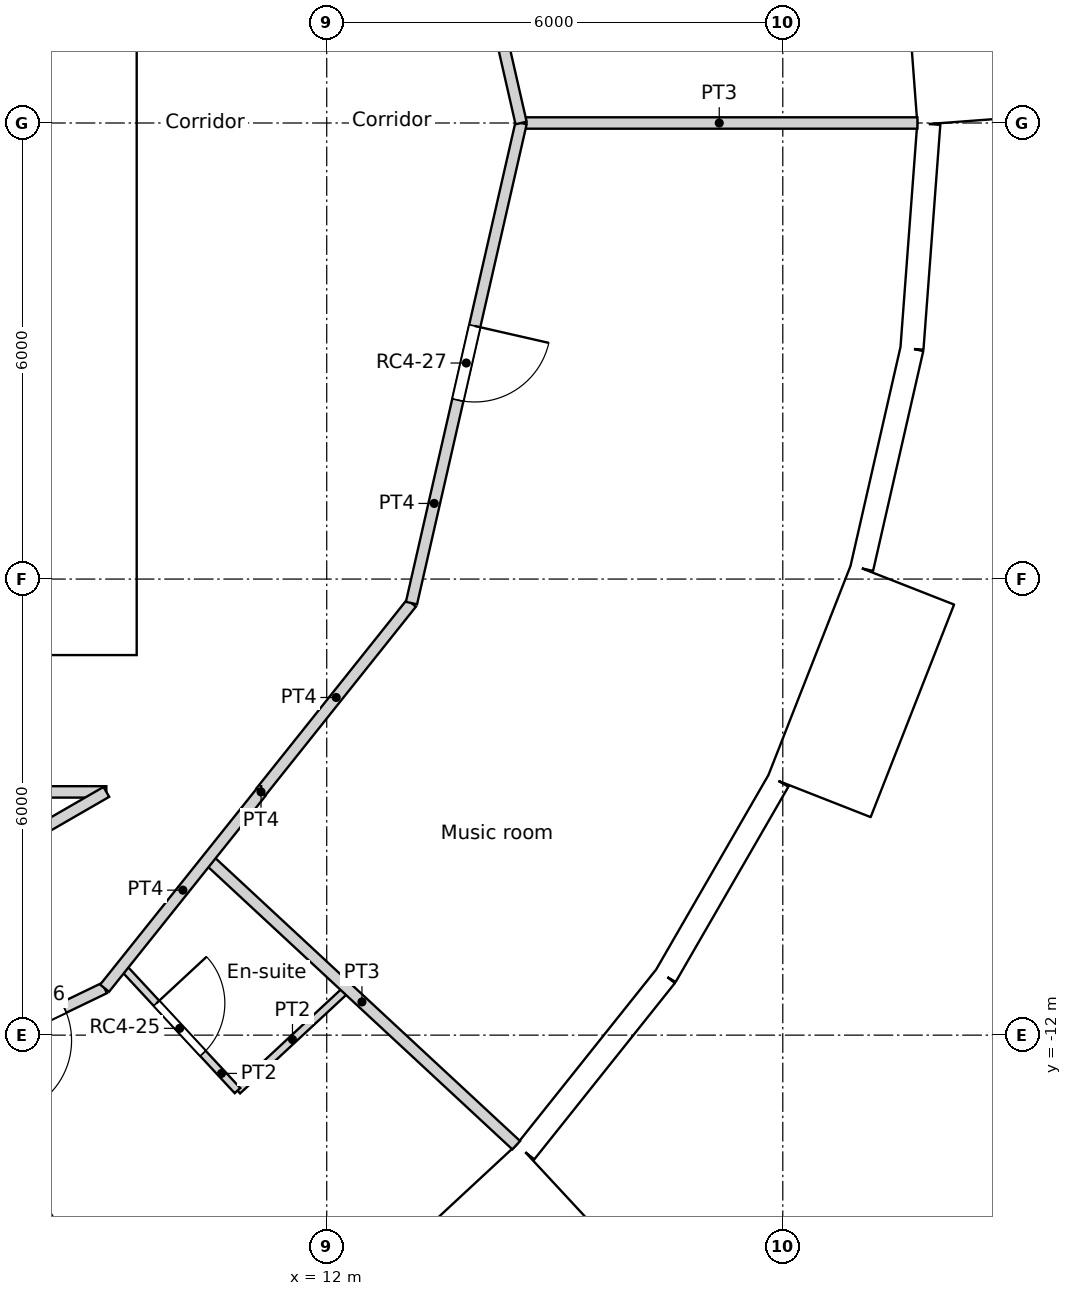
"""IFC4 building model, lengths in metres.
Left out: names, types, materials, properties, quantities, classifications, styles, units other than length and angle.
Written with IfcOpenShell. Run it as: python <this file> out.ifc"""

import sys

from ifc_helpers import new_model, si_unit, direction, frame, frame_2d, origin, origin_2d, place, context, subcontext, project, spatial, rectangle, circle, extrude, element, fill, save


model = new_model("IFC4")
c1 = context("Model", 3, precision=1e-05, world=origin(), true_north=direction((0.0, 1.0)))
c2 = subcontext(c1, "Body", "Model", "MODEL_VIEW")
j1 = project(units=[si_unit("LENGTHUNIT", "METRE"), si_unit("PLANEANGLEUNIT", "RADIAN")], contexts=[c1])
p1 = place(None, origin())
s1 = spatial("IfcSite", under=j1, at=p1, CompositionType="ELEMENT")
p2 = place(p1, origin())
s2 = spatial("IfcBuilding", under=s1, at=p2, CompositionType="ELEMENT")
p3 = place(p2, frame((0.0, 0.0, 263.4)))
s3 = spatial("IfcBuildingStorey", under=s2, at=p3, CompositionType="ELEMENT", Elevation=263.4)
for number, where, z_axis, x_axis in (
    (1, (18.822, 0.0, 0.0), (0.0, 0.0, 1.0), (1.0, 0.0, 0.0)),
    (2, (11.735, -14.716, 0.0), (0.0, 0.0, 1.0), (1.0, 0.0, 0.0)),
    (3, (15.552, -10.603, 0.0), (0.0, 0.0, 1.0), (1.0, 0.0, 0.0)),
    (4, (17.986, -5.548, 0.0), (0.0, 0.0, 1.0), (1.0, 0.0, 0.0)),
):
    element("IfcColumn", number, at=place(p3, frame(where, z_axis=z_axis, x_axis=x_axis)), inside=s3, PredefinedType="COLUMN", context=c2, shape_type="SweptSolid", body=[
        extrude(circle(Radius=0.55, at=origin_2d()), origin(), (0.0, 0.0, 1.0), 3.6),
    ])
p4 = place(p3, frame((20.496, 0.032, -0.35), z_axis=(0.0, 0.0, 1.0), x_axis=(-0.074785902127, 0.997199613339, 0.0)))
e5 = element("IfcWall", 5, at=p4, inside=s3, PredefinedType="ELEMENTEDWALL", context=c2, shape_type="SweptSolid", body=[
    extrude(rectangle(XDim=3.0, YDim=1.45, at=frame_2d((1.5, 0.0))), origin(), (0.0, 0.0, 1.0), 3.6),
])
p5 = place(p4, frame((1.5, 0.0, 1.9)))
e6 = element("IfcOpeningElement", 6, at=p5, cuts=e5, PredefinedType="OPENING", context=c2, shape_type="SweptSolid", body=[
    extrude(circle(Radius=0.9, at=origin_2d()), frame((0.0, 0.735, 0.0), z_axis=(0.0, -1.0, 0.0), x_axis=(1.0, 0.0, 0.0)), (0.0, 0.0, 1.0), 1.47),
])
p6 = place(p3, frame((12.804, -16.005, -0.35), z_axis=(0.0, 0.0, 1.0), x_axis=(0.733022439167, 0.680204457261, 0.0)))
e7 = element("IfcWall", 7, at=p6, inside=s3, PredefinedType="ELEMENTEDWALL", context=c2, shape_type="SweptSolid", body=[
    extrude(rectangle(XDim=3.0, YDim=1.45, at=frame_2d((1.5, 0.0))), origin(), (0.0, 0.0, 1.0), 3.6),
])
p7 = place(p6, frame((1.5, 0.0, 1.9)))
e8 = element("IfcOpeningElement", 8, at=p7, cuts=e7, PredefinedType="OPENING", context=c2, shape_type="SweptSolid", body=[
    extrude(circle(Radius=0.9, at=origin_2d()), frame((0.0, 0.735, 0.0), z_axis=(0.0, -1.0, 0.0), x_axis=(1.0, 0.0, 0.0)), (0.0, 0.0, 1.0), 1.47),
])
p8 = place(p3, frame((14.613, -13.538, 0.0), z_axis=(0.0, 0.0, 1.0), x_axis=(0.623498236992, 0.781824755599, 0.0)))
e9 = element("IfcWall", 9, at=p8, inside=s3, PredefinedType="SOLIDWALL", context=c2, shape_type="SweptSolid", body=[
    extrude(rectangle(XDim=2.962, YDim=0.3, at=frame_2d((1.481, 0.0))), origin(), (0.0, 0.0, 1.0), 3.25),
])
p9 = place(p8, frame((1.481, 0.0, 1.55)))
e10 = element("IfcOpeningElement", 10, at=p9, cuts=e9, PredefinedType="OPENING", context=c2, shape_type="SweptSolid", body=[
    extrude(circle(Radius=0.9, at=origin_2d()), frame((0.0, 0.16, 0.0), z_axis=(0.0, -1.0, 0.0), x_axis=(1.0, 0.0, 0.0)), (0.0, 0.0, 1.0), 0.32),
])
p10 = place(p3, frame((16.46, -11.222, 0.0), z_axis=(0.0, 0.0, 1.0), x_axis=(0.499950756475, 0.86605383268, 0.0)))
e11 = element("IfcWall", 11, at=p10, inside=s3, PredefinedType="SOLIDWALL", context=c2, shape_type="SweptSolid", body=[
    extrude(rectangle(XDim=2.962, YDim=0.3, at=frame_2d((1.481, 0.0))), origin(), (0.0, 0.0, 1.0), 3.25),
])
p11 = place(p10, frame((1.481, 0.0, 1.55)))
e12 = element("IfcOpeningElement", 12, at=p11, cuts=e11, PredefinedType="OPENING", context=c2, shape_type="SweptSolid", body=[
    extrude(circle(Radius=0.9, at=origin_2d()), frame((0.0, 0.16, 0.0), z_axis=(0.0, -1.0, 0.0), x_axis=(1.0, 0.0, 0.0)), (0.0, 0.0, 1.0), 0.32),
])
p12 = place(p3, frame((18.48, -8.864, -0.35), z_axis=(0.0, 0.0, 1.0), x_axis=(0.36537792632, 0.93085926485, 0.0)))
e13 = element("IfcWall", 13, at=p12, inside=s3, PredefinedType="ELEMENTEDWALL", context=c2, shape_type="SweptSolid", body=[
    extrude(rectangle(XDim=3.0, YDim=1.45, at=frame_2d((1.5, 0.0))), origin(), (0.0, 0.0, 1.0), 3.6),
])
p13 = place(p12, frame((1.5, 0.0, 1.9)))
e14 = element("IfcOpeningElement", 14, at=p13, cuts=e13, PredefinedType="OPENING", context=c2, shape_type="SweptSolid", body=[
    extrude(circle(Radius=0.9, at=origin_2d()), frame((0.0, 0.735, 0.0), z_axis=(0.0, -1.0, 0.0), x_axis=(1.0, 0.0, 0.0)), (0.0, 0.0, 1.0), 1.47),
])
p14 = place(p3, frame((19.04, -5.857, 0.0), z_axis=(0.0, 0.0, 1.0), x_axis=(0.222529389789, 0.974925982155, 0.0)))
e15 = element("IfcWall", 15, at=p14, inside=s3, PredefinedType="SOLIDWALL", context=c2, shape_type="SweptSolid", body=[
    extrude(rectangle(XDim=2.962, YDim=0.3, at=frame_2d((1.481, 0.0))), origin(), (0.0, 0.0, 1.0), 3.25),
])
p15 = place(p14, frame((1.481, 0.0, 1.55)))
e16 = element("IfcOpeningElement", 16, at=p15, cuts=e15, PredefinedType="OPENING", context=c2, shape_type="SweptSolid", body=[
    extrude(circle(Radius=0.9, at=origin_2d()), frame((0.0, 0.16, 0.0), z_axis=(0.0, -1.0, 0.0), x_axis=(1.0, 0.0, 0.0)), (0.0, 0.0, 1.0), 0.32),
])
p16 = place(p3, frame((19.699, -2.969, 0.0), z_axis=(0.0, 0.0, 1.0), x_axis=(0.07474897196, 0.997202382263, 0.0)))
e17 = element("IfcWall", 17, at=p16, inside=s3, PredefinedType="SOLIDWALL", context=c2, shape_type="SweptSolid", body=[
    extrude(rectangle(XDim=2.962, YDim=0.3, at=frame_2d((1.481, 0.0))), origin(), (0.0, 0.0, 1.0), 3.25),
])
p17 = place(p16, frame((1.481, 0.0, 1.55)))
e18 = element("IfcOpeningElement", 18, at=p17, cuts=e17, PredefinedType="OPENING", context=c2, shape_type="SweptSolid", body=[
    extrude(circle(Radius=0.9, at=origin_2d()), frame((0.0, 0.16, 0.0), z_axis=(0.0, -1.0, 0.0), x_axis=(1.0, 0.0, 0.0)), (0.0, 0.0, 1.0), 0.32),
])
p18 = place(p3, frame((-9.5, -6.7, 0.0), z_axis=(0.0, 0.0, 1.0), x_axis=(1.0, 0.0, 0.0)))
e19 = element("IfcWall", 19, at=p18, inside=s3, PredefinedType="SOLIDWALL", context=c2, shape_type="SweptSolid", body=[
    extrude(rectangle(XDim=19.0, YDim=0.6, at=frame_2d((9.5, 0.0))), origin(), (0.0, 0.0, 1.0), 3.6),
])
p19 = place(p18, frame((10.4, 0.0, 0.0)))
e20 = element("IfcOpeningElement", 20, at=p19, cuts=e19, PredefinedType="OPENING", context=c2, shape_type="SweptSolid", body=[
    extrude(rectangle(XDim=1.0, YDim=2.1, at=frame_2d((0.5, 1.05))), frame((0.0, 0.3, 0.0), z_axis=(0.0, -1.0, 0.0), x_axis=(1.0, 0.0, 0.0)), (0.0, 0.0, 1.0), 0.6),
])
p20 = place(p18, frame((5.35, 0.0, 0.0)))
e21 = element("IfcOpeningElement", 21, at=p20, cuts=e19, PredefinedType="OPENING", context=c2, shape_type="SweptSolid", body=[
    extrude(rectangle(XDim=1.7, YDim=2.1, at=frame_2d((0.85, 1.05))), frame((0.0, 0.3, 0.0), z_axis=(0.0, -1.0, 0.0), x_axis=(1.0, 0.0, 0.0)), (0.0, 0.0, 1.0), 0.6),
])
p21 = place(p18, frame((11.95, 0.0, 0.0)))
e22 = element("IfcOpeningElement", 22, at=p21, cuts=e19, PredefinedType="OPENING", context=c2, shape_type="SweptSolid", body=[
    extrude(rectangle(XDim=1.7, YDim=2.1, at=frame_2d((0.85, 1.05))), frame((0.0, 0.3, 0.0), z_axis=(0.0, -1.0, 0.0), x_axis=(1.0, 0.0, 0.0)), (0.0, 0.0, 1.0), 0.6),
])
p22 = place(p3, frame((9.2, -6.4, 0.0), z_axis=(0.0, 0.0, 1.0), x_axis=(0.0, 1.0, 0.0)))
e23 = element("IfcWall", 23, at=p22, inside=s3, PredefinedType="SOLIDWALL", context=c2, shape_type="SweptSolid", body=[
    extrude(rectangle(XDim=12.8, YDim=0.6, at=frame_2d((6.4, 0.0))), origin(), (0.0, 0.0, 1.0), 3.6),
])
p23 = place(p22, frame((6.4, 0.0, 0.0)))
e24 = element("IfcOpeningElement", 24, at=p23, cuts=e23, PredefinedType="OPENING", context=c2, shape_type="SweptSolid", body=[
    extrude(rectangle(XDim=1.8, YDim=2.1, at=frame_2d((0.9, 1.05))), frame((0.0, 0.3, 0.0), z_axis=(0.0, -1.0, 0.0), x_axis=(1.0, 0.0, 0.0)), (0.0, 0.0, 1.0), 0.6),
])
p24 = place(p3, frame((2.1, -3.1, 0.0), z_axis=(0.0, 0.0, 1.0), x_axis=(1.0, 0.0, 0.0)))
e25 = element("IfcWall", 25, at=p24, inside=s3, PredefinedType="SOLIDWALL", context=c2, shape_type="SweptSolid", body=[
    extrude(rectangle(XDim=6.8, YDim=0.3, at=frame_2d((3.4, 0.0))), origin(), (0.0, 0.0, 1.0), 3.25),
])
p25 = place(p24, frame((0.35, 0.0, 0.0)))
e26 = element("IfcOpeningElement", 26, at=p25, cuts=e25, PredefinedType="OPENING", context=c2, shape_type="SweptSolid", body=[
    extrude(rectangle(XDim=1.7, YDim=2.1, at=frame_2d((0.85, 1.05))), frame((0.0, 0.15, 0.0), z_axis=(0.0, -1.0, 0.0), x_axis=(1.0, 0.0, 0.0)), (0.0, 0.0, 1.0), 0.3),
])
p26 = place(p3, frame((5.85, -0.425, 0.0), z_axis=(0.0, 0.0, 1.0), x_axis=(1.0, 0.0, 0.0)))
e27 = element("IfcWall", 27, at=p26, inside=s3, PredefinedType="SOLIDWALL", context=c2, shape_type="SweptSolid", body=[
    extrude(rectangle(XDim=3.05, YDim=0.15, at=frame_2d((1.525, 0.0))), origin(), (0.0, 0.0, 1.0), 3.25),
])
p27 = place(p26, frame((0.25, 0.0, 0.0)))
e28 = element("IfcOpeningElement", 28, at=p27, cuts=e27, PredefinedType="OPENING", context=c2, shape_type="SweptSolid", body=[
    extrude(rectangle(XDim=0.9, YDim=2.1, at=frame_2d((0.45, 1.05))), frame((0.0, 0.075, 0.0), z_axis=(0.0, -1.0, 0.0), x_axis=(1.0, 0.0, 0.0)), (0.0, 0.0, 1.0), 0.15),
])
p28 = place(p26, frame((1.775, 0.0, 0.0)))
e29 = element("IfcOpeningElement", 29, at=p28, cuts=e27, PredefinedType="OPENING", context=c2, shape_type="SweptSolid", body=[
    extrude(rectangle(XDim=0.9, YDim=2.1, at=frame_2d((0.45, 1.05))), frame((0.0, 0.075, 0.0), z_axis=(0.0, -1.0, 0.0), x_axis=(1.0, 0.0, 0.0)), (0.0, 0.0, 1.0), 0.15),
])
p29 = place(p3, frame((-9.092, -8.8, 0.0), z_axis=(0.0, 0.0, 1.0), x_axis=(1.0, 0.0, 0.0)))
e30 = element("IfcWall", 30, at=p29, inside=s3, PredefinedType="PARTITIONING", context=c2, shape_type="SweptSolid", body=[
    extrude(rectangle(XDim=18.193, YDim=0.15, at=frame_2d((9.096, 0.0))), origin(), (0.0, 0.0, 1.0), 3.25),
])
p30 = place(p29, frame((8.592, 0.0, 0.0)))
e31 = element("IfcOpeningElement", 31, at=p30, cuts=e30, PredefinedType="OPENING", context=c2, shape_type="SweptSolid", body=[
    extrude(rectangle(XDim=1.0, YDim=2.04, at=frame_2d((0.5, 1.02))), frame((0.0, 0.075, 0.0), z_axis=(0.0, -1.0, 0.0), x_axis=(1.0, 0.0, 0.0)), (0.0, 0.0, 1.0), 0.15),
])
p31 = place(p3, frame((9.078, -11.382, 0.0), z_axis=(0.0, 0.0, 1.0), x_axis=(0.624018330412, 0.781409702595, 0.0)))
e32 = element("IfcWall", 32, at=p31, inside=s3, PredefinedType="PARTITIONING", context=c2, shape_type="SweptSolid", body=[
    extrude(rectangle(XDim=3.301, YDim=0.15, at=frame_2d((1.65, 0.0))), origin(), (0.0, 0.0, 1.0), 3.25),
])
p32 = place(p3, frame((11.137, -8.8, 0.0), z_axis=(0.0, 0.0, 1.0), x_axis=(-1.0, 0.0, 0.0)))
e33 = element("IfcWall", 33, at=p32, inside=s3, PredefinedType="PARTITIONING", context=c2, shape_type="SweptSolid", body=[
    extrude(rectangle(XDim=0.003, YDim=0.15, at=frame_2d((0.001, 0.0))), origin(), (0.0, 0.0, 1.0), 3.25),
])
p33 = place(p3, frame((13.115, 6.316, 0.0), z_axis=(0.0, 0.0, 1.0), x_axis=(0.222568978642, -0.97491694505, 0.0)))
e34 = element("IfcWall", 34, at=p33, inside=s3, PredefinedType="PARTITIONING", context=c2, shape_type="SweptSolid", body=[
    extrude(rectangle(XDim=6.479, YDim=0.15, at=frame_2d((3.239, 0.0))), origin(), (0.0, 0.0, 1.0), 3.25),
])
p34 = place(p33, frame((2.739, 0.0, 0.0)))
e35 = element("IfcOpeningElement", 35, at=p34, cuts=e34, PredefinedType="OPENING", context=c2, shape_type="SweptSolid", body=[
    extrude(rectangle(XDim=1.0, YDim=2.04, at=frame_2d((0.5, 1.02))), frame((0.0, 0.075, 0.0), z_axis=(0.0, -1.0, 0.0), x_axis=(1.0, 0.0, 0.0)), (0.0, 0.0, 1.0), 0.15),
])
p35 = place(p3, frame((13.115, -6.316, 0.0), z_axis=(0.0, 0.0, 1.0), x_axis=(0.222568978642, 0.97491694505, 0.0)))
e36 = element("IfcWall", 36, at=p35, inside=s3, PredefinedType="PARTITIONING", context=c2, shape_type="SweptSolid", body=[
    extrude(rectangle(XDim=6.479, YDim=0.15, at=frame_2d((3.239, 0.0))), origin(), (0.0, 0.0, 1.0), 3.25),
])
p36 = place(p35, frame((2.74, 0.0, 0.0)))
e37 = element("IfcOpeningElement", 37, at=p36, cuts=e36, PredefinedType="OPENING", context=c2, shape_type="SweptSolid", body=[
    extrude(rectangle(XDim=1.0, YDim=2.04, at=frame_2d((0.5, 1.02))), frame((0.0, 0.075, 0.0), z_axis=(0.0, -1.0, 0.0), x_axis=(1.0, 0.0, 0.0)), (0.0, 0.0, 1.0), 0.15),
])
p37 = place(p3, frame((11.134, -8.8, 0.0), z_axis=(0.0, 0.0, 1.0), x_axis=(0.623476099415, 0.781842409606, 0.0)))
e38 = element("IfcWall", 38, at=p37, inside=s3, PredefinedType="PARTITIONING", context=c2, shape_type="SweptSolid", body=[
    extrude(rectangle(XDim=3.177, YDim=0.15, at=frame_2d((1.589, 0.0))), origin(), (0.0, 0.0, 1.0), 3.25),
])
p38 = place(p3, frame((3.261, -12.171, 0.0), z_axis=(0.0, 0.0, 1.0), x_axis=(0.866066809554, 0.499928276245, 0.0)))
e39 = element("IfcWall", 39, at=p38, inside=s3, PredefinedType="PARTITIONING", context=c2, shape_type="SweptSolid", body=[
    extrude(rectangle(XDim=6.743, YDim=0.15, at=frame_2d((3.371, 0.0))), origin(), (0.0, 0.0, 1.0), 3.25),
])
p39 = place(p3, frame((3.239, -14.192, 0.0), z_axis=(0.0, 0.0, 1.0), x_axis=(0.900939467372, 0.433944784657, 0.0)))
e40 = element("IfcWall", 40, at=p39, inside=s3, PredefinedType="PARTITIONING", context=c2, shape_type="SweptSolid", body=[
    extrude(rectangle(XDim=6.479, YDim=0.15, at=frame_2d((3.239, 0.0))), origin(), (0.0, 0.0, 1.0), 3.25),
])
p40 = place(p39, frame((2.567, 0.0, 0.0)))
e41 = element("IfcOpeningElement", 41, at=p40, cuts=e40, PredefinedType="OPENING", context=c2, shape_type="SweptSolid", body=[
    extrude(rectangle(XDim=1.0, YDim=2.1, at=frame_2d((0.5, 1.05))), frame((0.0, 0.075, 0.0), z_axis=(0.0, -1.0, 0.0), x_axis=(1.0, 0.0, 0.0)), (0.0, 0.0, 1.0), 0.15),
])
p41 = place(p39, frame((4.889, 0.0, 0.0)))
e42 = element("IfcOpeningElement", 42, at=p41, cuts=e40, PredefinedType="OPENING", context=c2, shape_type="SweptSolid", body=[
    extrude(rectangle(XDim=1.0, YDim=2.1, at=frame_2d((0.5, 1.05))), frame((0.0, 0.075, 0.0), z_axis=(0.0, -1.0, 0.0), x_axis=(1.0, 0.0, 0.0)), (0.0, 0.0, 1.0), 0.15),
])
p42 = place(p3, frame((14.557, 0.0, 0.0), z_axis=(0.0, 0.0, 1.0), x_axis=(1.0, 0.0, 0.0)))
e43 = element("IfcWall", 43, at=p42, inside=s3, PredefinedType="PARTITIONING", context=c2, shape_type="SweptSolid", body=[
    extrude(rectangle(XDim=5.214, YDim=0.15, at=frame_2d((2.607, 0.0))), origin(), (0.0, 0.0, 1.0), 3.25),
])
p43 = place(p3, frame((7.116, -12.325, 0.0), z_axis=(0.0, 0.0, 1.0), x_axis=(0.500054359786, -0.865994016873, 0.0)))
e44 = element("IfcWall", 44, at=p43, inside=s3, PredefinedType="PARTITIONING", context=c2, shape_type="SweptSolid", body=[
    extrude(rectangle(XDim=5.54, YDim=0.15, at=frame_2d((2.77, 0.0))), origin(), (0.0, 0.0, 1.0), 3.25),
])
p44 = place(p3, frame((9.306, -11.092, 0.0), z_axis=(0.0, 0.0, 1.0), x_axis=(0.680228963773, -0.732999697711, 0.0)))
e45 = element("IfcWall", 45, at=p44, inside=s3, PredefinedType="PARTITIONING", context=c2, shape_type="SweptSolid", body=[
    extrude(rectangle(XDim=2.235, YDim=0.1, at=frame_2d((1.117, 0.0))), origin(), (0.0, 0.0, 1.0), 3.25),
])
p45 = place(p44, frame((0.667, 0.0, 0.0)))
e46 = element("IfcOpeningElement", 46, at=p45, cuts=e45, PredefinedType="OPENING", context=c2, shape_type="SweptSolid", body=[
    extrude(rectangle(XDim=0.9, YDim=2.04, at=frame_2d((0.45, 1.02))), frame((0.0, 0.05, 0.0), z_axis=(0.0, -1.0, 0.0), x_axis=(1.0, 0.0, 0.0)), (0.0, 0.0, 1.0), 0.1),
])
p46 = place(p3, frame((10.826, -12.73, 0.0), z_axis=(0.0, 0.0, 1.0), x_axis=(0.732956436026, 0.680275578636, 0.0)))
e47 = element("IfcWall", 47, at=p46, inside=s3, PredefinedType="PARTITIONING", context=c2, shape_type="SweptSolid", body=[
    extrude(rectangle(XDim=1.974, YDim=0.1, at=frame_2d((0.987, 0.0))), origin(), (0.0, 0.0, 1.0), 3.25),
])
p47 = place(p3, frame((10.434, -9.679, 0.0), z_axis=(0.0, 0.0, 1.0), x_axis=(0.732845293448, -0.680395308531, 0.0)))
e48 = element("IfcWall", 48, at=p47, inside=s3, PredefinedType="PARTITIONING", context=c2, shape_type="SweptSolid", body=[
    extrude(rectangle(XDim=5.539, YDim=0.15, at=frame_2d((2.77, 0.0))), origin(), (0.0, 0.0, 1.0), 3.25),
])
p48 = place(p5, origin())
e49 = element("IfcWindow", 49, at=p48, inside=s3, PartitioningType="SINGLE_PANEL", PredefinedType="WINDOW", context=c2, shape_type="SweptSolid", body=[
    extrude(circle(Radius=0.9, at=origin_2d()), frame((0.0, 0.695, 0.0), z_axis=(0.0, -1.0, 0.0), x_axis=(1.0, 0.0, 0.0)), (0.0, 0.0, 1.0), 0.1),
])
fill(e6, e49)
p49 = place(p7, origin())
e50 = element("IfcWindow", 50, at=p49, inside=s3, PartitioningType="SINGLE_PANEL", PredefinedType="WINDOW", context=c2, shape_type="SweptSolid", body=[
    extrude(circle(Radius=0.9, at=origin_2d()), frame((0.0, 0.695, 0.0), z_axis=(0.0, -1.0, 0.0), x_axis=(1.0, 0.0, 0.0)), (0.0, 0.0, 1.0), 0.1),
])
fill(e8, e50)
p50 = place(p9, origin())
e51 = element("IfcWindow", 51, at=p50, inside=s3, PartitioningType="SINGLE_PANEL", PredefinedType="WINDOW", context=c2, shape_type="SweptSolid", body=[
    extrude(circle(Radius=0.9, at=origin_2d()), frame((0.0, 0.12, 0.0), z_axis=(0.0, -1.0, 0.0), x_axis=(1.0, 0.0, 0.0)), (0.0, 0.0, 1.0), 0.1),
])
fill(e10, e51)
p51 = place(p11, origin())
e52 = element("IfcWindow", 52, at=p51, inside=s3, PartitioningType="SINGLE_PANEL", PredefinedType="WINDOW", context=c2, shape_type="SweptSolid", body=[
    extrude(circle(Radius=0.9, at=origin_2d()), frame((0.0, 0.12, 0.0), z_axis=(0.0, -1.0, 0.0), x_axis=(1.0, 0.0, 0.0)), (0.0, 0.0, 1.0), 0.1),
])
fill(e12, e52)
p52 = place(p13, origin())
e53 = element("IfcWindow", 53, at=p52, inside=s3, PartitioningType="SINGLE_PANEL", PredefinedType="WINDOW", context=c2, shape_type="SweptSolid", body=[
    extrude(circle(Radius=0.9, at=origin_2d()), frame((0.0, 0.695, 0.0), z_axis=(0.0, -1.0, 0.0), x_axis=(1.0, 0.0, 0.0)), (0.0, 0.0, 1.0), 0.1),
])
fill(e14, e53)
p53 = place(p15, origin())
e54 = element("IfcWindow", 54, at=p53, inside=s3, PartitioningType="SINGLE_PANEL", PredefinedType="WINDOW", context=c2, shape_type="SweptSolid", body=[
    extrude(circle(Radius=0.9, at=origin_2d()), frame((0.0, 0.12, 0.0), z_axis=(0.0, -1.0, 0.0), x_axis=(1.0, 0.0, 0.0)), (0.0, 0.0, 1.0), 0.1),
])
fill(e16, e54)
p54 = place(p17, origin())
e55 = element("IfcWindow", 55, at=p54, inside=s3, PartitioningType="SINGLE_PANEL", PredefinedType="WINDOW", context=c2, shape_type="SweptSolid", body=[
    extrude(circle(Radius=0.9, at=origin_2d()), frame((0.0, 0.12, 0.0), z_axis=(0.0, -1.0, 0.0), x_axis=(1.0, 0.0, 0.0)), (0.0, 0.0, 1.0), 0.1),
])
fill(e18, e55)
p55 = place(p23, origin())
e56 = element("IfcDoor", 56, at=p55, inside=s3, OperationType="DOUBLE_DOOR_SINGLE_SWING", PredefinedType="DOOR", context=c2, shape_type="SweptSolid", body=[
    extrude(rectangle(XDim=1.8, YDim=2.1, at=frame_2d((0.9, 1.05))), frame((0.0, 0.025, 0.0), z_axis=(0.0, -1.0, 0.0), x_axis=(1.0, 0.0, 0.0)), (0.0, 0.0, 1.0), 0.05),
])
fill(e24, e56)
p56 = place(p28, origin())
e57 = element("IfcDoor", 57, at=p56, inside=s3, OperationType="SINGLE_SWING_LEFT", PredefinedType="DOOR", context=c2, shape_type="SweptSolid", body=[
    extrude(rectangle(XDim=0.9, YDim=2.1, at=frame_2d((0.45, 1.05))), frame((0.0, 0.025, 0.0), z_axis=(0.0, -1.0, 0.0), x_axis=(1.0, 0.0, 0.0)), (0.0, 0.0, 1.0), 0.05),
])
fill(e29, e57)
p57 = place(p45, origin())
e58 = element("IfcDoor", 58, at=p57, inside=s3, OperationType="SINGLE_SWING_LEFT", PredefinedType="DOOR", context=c2, shape_type="SweptSolid", body=[
    extrude(rectangle(XDim=0.9, YDim=2.04, at=frame_2d((0.45, 1.02))), frame((0.0, 0.025, 0.0), z_axis=(0.0, -1.0, 0.0), x_axis=(1.0, 0.0, 0.0)), (0.0, 0.0, 1.0), 0.05),
])
fill(e46, e58)
p58 = place(p41, origin())
e59 = element("IfcDoor", 59, at=p58, inside=s3, OperationType="SINGLE_SWING_RIGHT", PredefinedType="DOOR", context=c2, shape_type="SweptSolid", body=[
    extrude(rectangle(XDim=1.0, YDim=2.1, at=frame_2d((0.5, 1.05))), frame((0.0, 0.025, 0.0), z_axis=(0.0, -1.0, 0.0), x_axis=(1.0, 0.0, 0.0)), (0.0, 0.0, 1.0), 0.05),
])
fill(e42, e59)
p59 = place(p36, origin())
e60 = element("IfcDoor", 60, at=p59, inside=s3, OperationType="SINGLE_SWING_LEFT", PredefinedType="DOOR", context=c2, shape_type="SweptSolid", body=[
    extrude(rectangle(XDim=1.0, YDim=2.04, at=frame_2d((0.5, 1.02))), frame((0.0, 0.025, 0.0), z_axis=(0.0, -1.0, 0.0), x_axis=(1.0, 0.0, 0.0)), (0.0, 0.0, 1.0), 0.05),
])
fill(e37, e60)
save(model, sys.argv[1])
